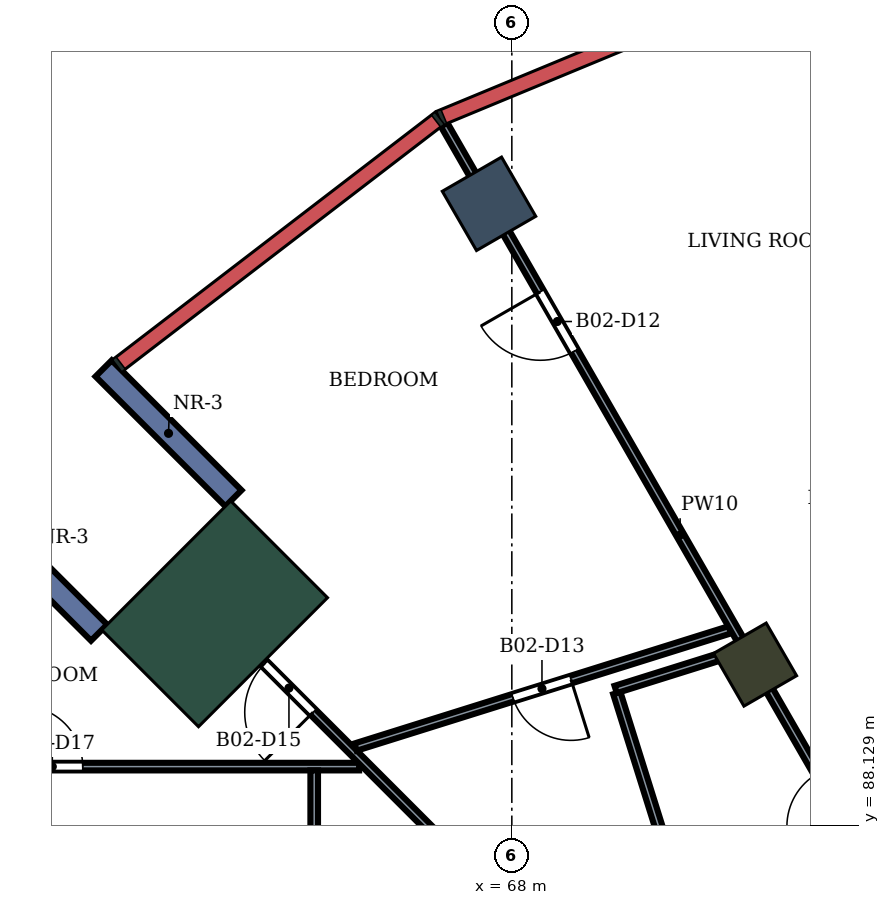
"""IFC4 building model, lengths in metres.
Left out: names, types, materials, properties, quantities, classifications, styles, units other than length and angle.
Written with IfcOpenShell. Run it as: python <this file> out.ifc"""

import sys

from ifc_helpers import new_model, si_unit, direction, frame, frame_2d, origin, origin_2d, place, context, subcontext, project, spatial, rectangle, extrude, element, fill, save


model = new_model("IFC4")
c1 = context("Model", 3, precision=1e-05, world=origin(), true_north=direction((0.0, 1.0)))
c2 = subcontext(c1, "Body", "Model", "MODEL_VIEW")
j1 = project(units=[si_unit("LENGTHUNIT", "METRE"), si_unit("PLANEANGLEUNIT", "RADIAN")], contexts=[c1])
p1 = place(None, origin())
s1 = spatial("IfcSite", under=j1, at=p1, CompositionType="ELEMENT")
p2 = place(p1, origin())
s2 = spatial("IfcBuilding", under=s1, at=p2, CompositionType="ELEMENT")
p3 = place(p2, frame((0.0, 0.0, 225.1)))
s3 = spatial("IfcBuildingStorey", under=s2, at=p3, CompositionType="ELEMENT", Elevation=225.1)
p4 = place(p3, frame((67.7, 96.304, 0.0), z_axis=(0.0, 0.0, 1.0), x_axis=(-0.5, 0.866025403784, 0.0)))
e1 = element("IfcColumn", 1, at=p4, inside=s3, PredefinedType="COLUMN", context=c2, shape_type="SweptSolid", body=[
    extrude(rectangle(XDim=0.9, YDim=0.9, at=origin_2d()), origin(), (0.0, 0.0, 1.0), 4.2),
])
p5 = place(p3, frame((71.2, 90.242, 0.0), z_axis=(0.0, 0.0, 1.0), x_axis=(-0.5, 0.866025403784, 0.0)))
e2 = element("IfcColumn", 2, at=p5, inside=s3, PredefinedType="COLUMN", context=c2, shape_type="SweptSolid", body=[
    extrude(rectangle(XDim=0.8, YDim=0.8, at=origin_2d()), origin(), (0.0, 0.0, 1.0), 4.2),
])
p6 = place(p3, frame((64.09, 90.91, 0.0), z_axis=(0.0, 0.0, 1.0), x_axis=(-0.707106781187, 0.707106781187, 0.0)))
e3 = element("IfcColumn", 3, at=p6, inside=s3, PredefinedType="COLUMN", context=c2, shape_type="SweptSolid", body=[
    extrude(rectangle(XDim=1.8, YDim=2.4, at=origin_2d()), origin(), (0.0, 0.0, 1.0), 4.2),
])
for number, where, z_axis, x_axis in (
    (4, (64.338, 92.43, 0.0), (0.0, 0.0, 1.0), (-0.707, 0.707, 0.0)),
    (5, (62.57, 90.662, 0.0), (0.0, 0.0, 1.0), (-0.707, 0.707, 0.0)),
):
    element("IfcWall", number, at=place(p3, frame(where, z_axis=z_axis, x_axis=x_axis)), inside=s3, PredefinedType="NOTDEFINED", context=c2, shape_type="SweptSolid", body=[
        extrude(rectangle(XDim=2.416, YDim=0.3, at=frame_2d((1.208, 0.0))), origin(), (0.0, 0.0, 1.0), 4.2),
    ])
p7 = place(p3, frame((58.379, 88.9, 0.0), z_axis=(0.0, 0.0, 1.0), x_axis=(1.0, 0.0, 0.0)))
e6 = element("IfcWall", 6, at=p7, inside=s3, PredefinedType="PARTITIONING", context=c2, shape_type="SweptSolid", body=[
    extrude(rectangle(XDim=7.612, YDim=0.1, at=frame_2d((3.806, 0.0))), origin(), (0.0, 0.0, 1.0), 3.75),
])
p8 = place(p7, frame((3.176, 0.0, 0.0)))
e7 = element("IfcOpeningElement", 7, at=p8, cuts=e6, PredefinedType="OPENING", context=c2, shape_type="SweptSolid", body=[
    extrude(rectangle(XDim=0.8, YDim=2.1, at=frame_2d((0.4, 1.05))), frame((0.0, 0.06, 0.0), z_axis=(0.0, -1.0, 0.0), x_axis=(1.0, 0.0, 0.0)), (0.0, 0.0, 1.0), 0.12),
])
p9 = place(p3, frame((63.596, 91.406, 0.0), z_axis=(0.0, 0.0, 1.0), x_axis=(0.70700623685, -0.707207311228, 0.0)))
e8 = element("IfcWall", 8, at=p9, inside=s3, PredefinedType="PARTITIONING", context=c2, shape_type="SweptSolid", body=[
    extrude(rectangle(XDim=8.499, YDim=0.1, at=frame_2d((4.25, 0.0))), origin(), (0.0, 0.0, 1.0), 3.75),
])
p10 = place(p9, frame((1.632, 0.0, 0.0)))
e9 = element("IfcOpeningElement", 9, at=p10, cuts=e8, PredefinedType="OPENING", context=c2, shape_type="SweptSolid", body=[
    extrude(rectangle(XDim=0.9, YDim=2.1, at=frame_2d((0.45, 1.05))), frame((0.0, 0.06, 0.0), z_axis=(0.0, -1.0, 0.0), x_axis=(1.0, 0.0, 0.0)), (0.0, 0.0, 1.0), 0.12),
])
p11 = place(p3, frame((65.4, 85.0, 0.0), z_axis=(0.0, 0.0, 1.0), x_axis=(0.0, 1.0, 0.0)))
e10 = element("IfcWall", 10, at=p11, inside=s3, PredefinedType="PARTITIONING", context=c2, shape_type="SweptSolid", body=[
    extrude(rectangle(XDim=3.85, YDim=0.1, at=frame_2d((1.925, 0.0))), origin(), (0.0, 0.0, 1.0), 3.75),
])
p12 = place(p11, frame((1.5, 0.0, 0.0)))
e11 = element("IfcOpeningElement", 11, at=p12, cuts=e10, PredefinedType="OPENING", context=c2, shape_type="SweptSolid", body=[
    extrude(rectangle(XDim=0.8, YDim=2.1, at=frame_2d((0.4, 1.05))), frame((0.0, 0.06, 0.0), z_axis=(0.0, -1.0, 0.0), x_axis=(1.0, 0.0, 0.0)), (0.0, 0.0, 1.0), 0.12),
])
p13 = place(p3, frame((65.944, 89.157, 0.0), z_axis=(0.0, 0.0, 1.0), x_axis=(0.954235485309, 0.299056246512, 0.0)))
e12 = element("IfcWall", 12, at=p13, inside=s3, PredefinedType="PARTITIONING", context=c2, shape_type="SweptSolid", body=[
    extrude(rectangle(XDim=5.159, YDim=0.1, at=frame_2d((2.58, 0.0))), origin(), (0.0, 0.0, 1.0), 3.75),
])
p14 = place(p13, frame((2.17, 0.0, 0.0)))
e13 = element("IfcOpeningElement", 13, at=p14, cuts=e12, PredefinedType="OPENING", context=c2, shape_type="SweptSolid", body=[
    extrude(rectangle(XDim=0.8, YDim=2.1, at=frame_2d((0.4, 1.05))), frame((0.0, 0.06, 0.0), z_axis=(0.0, -1.0, 0.0), x_axis=(1.0, 0.0, 0.0)), (0.0, 0.0, 1.0), 0.12),
])
p15 = place(p3, frame((67.109, 97.346, 0.0), z_axis=(0.0, 0.0, 1.0), x_axis=(0.498583439824, -0.866841711925, 0.0)))
e14 = element("IfcWall", 14, at=p15, inside=s3, PredefinedType="PARTITIONING", context=c2, shape_type="SweptSolid", body=[
    extrude(rectangle(XDim=12.456, YDim=0.1, at=frame_2d((6.228, 0.0))), origin(), (0.0, 0.0, 1.0), 3.75),
])
p16 = place(p15, frame((2.538, 0.0, 0.0)))
e15 = element("IfcOpeningElement", 15, at=p16, cuts=e14, PredefinedType="OPENING", context=c2, shape_type="SweptSolid", body=[
    extrude(rectangle(XDim=0.9, YDim=2.1, at=frame_2d((0.45, 1.05))), frame((0.0, 0.06, 0.0), z_axis=(0.0, -1.0, 0.0), x_axis=(1.0, 0.0, 0.0)), (0.0, 0.0, 1.0), 0.12),
])
p17 = place(p15, frame((9.85, 0.0, 0.0)))
e16 = element("IfcOpeningElement", 16, at=p17, cuts=e14, PredefinedType="OPENING", context=c2, shape_type="SweptSolid", body=[
    extrude(rectangle(XDim=0.8, YDim=2.1, at=frame_2d((0.4, 1.05))), frame((0.0, 0.06, 0.0), z_axis=(0.0, -1.0, 0.0), x_axis=(1.0, 0.0, 0.0)), (0.0, 0.0, 1.0), 0.12),
])
p18 = place(p3, frame((69.381, 89.867, 0.0), z_axis=(0.0, 0.0, 1.0), x_axis=(0.29908659099, -0.954225974856, 0.0)))
e17 = element("IfcWall", 17, at=p18, inside=s3, PredefinedType="PARTITIONING", context=c2, shape_type="SweptSolid", body=[
    extrude(rectangle(XDim=4.35, YDim=0.1, at=frame_2d((2.175, 0.0))), origin(), (0.0, 0.0, 1.0), 3.75),
])
p19 = place(p3, frame((69.366, 89.915, 0.0), z_axis=(0.0, 0.0, 1.0), x_axis=(0.954163830168, 0.299284789457, 0.0)))
e18 = element("IfcWall", 18, at=p19, inside=s3, PredefinedType="PARTITIONING", context=c2, shape_type="SweptSolid", body=[
    extrude(rectangle(XDim=1.734, YDim=0.1, at=frame_2d((0.867, 0.0))), origin(), (0.0, 0.0, 1.0), 3.75),
])
p20 = place(p16, frame((0.9, 0.0, 0.0), z_axis=(0.0, 0.0, 1.0), x_axis=(-1.0, 0.0, 0.0)))
e19 = element("IfcDoor", 19, at=p20, inside=s3, OperationType="SINGLE_SWING_RIGHT", PredefinedType="DOOR", context=c2, shape_type="SweptSolid", body=[
    extrude(rectangle(XDim=0.9, YDim=2.1, at=frame_2d((0.45, 1.05))), frame((0.0, 0.025, 0.0), z_axis=(0.0, -1.0, 0.0), x_axis=(1.0, 0.0, 0.0)), (0.0, 0.0, 1.0), 0.05),
])
fill(e15, e19)
p21 = place(p14, frame((0.8, 0.0, 0.0), z_axis=(0.0, 0.0, 1.0), x_axis=(-1.0, 0.0, 0.0)))
e20 = element("IfcDoor", 20, at=p21, inside=s3, OperationType="SINGLE_SWING_LEFT", PredefinedType="DOOR", context=c2, shape_type="SweptSolid", body=[
    extrude(rectangle(XDim=0.8, YDim=2.1, at=frame_2d((0.4, 1.05))), frame((0.0, 0.025, 0.0), z_axis=(0.0, -1.0, 0.0), x_axis=(1.0, 0.0, 0.0)), (0.0, 0.0, 1.0), 0.05),
])
fill(e13, e20)
p22 = place(p10, frame((0.9, 0.0, 0.0), z_axis=(0.0, 0.0, 1.0), x_axis=(-1.0, 0.0, 0.0)))
e21 = element("IfcDoor", 21, at=p22, inside=s3, OperationType="SINGLE_SWING_LEFT", PredefinedType="DOOR", context=c2, shape_type="SweptSolid", body=[
    extrude(rectangle(XDim=0.9, YDim=2.1, at=frame_2d((0.45, 1.05))), frame((0.0, 0.025, 0.0), z_axis=(0.0, -1.0, 0.0), x_axis=(1.0, 0.0, 0.0)), (0.0, 0.0, 1.0), 0.05),
])
fill(e9, e21)
p23 = place(p8, origin())
e22 = element("IfcDoor", 22, at=p23, inside=s3, OperationType="SINGLE_SWING_LEFT", PredefinedType="DOOR", context=c2, shape_type="SweptSolid", body=[
    extrude(rectangle(XDim=0.8, YDim=2.1, at=frame_2d((0.4, 1.05))), frame((0.0, 0.025, 0.0), z_axis=(0.0, -1.0, 0.0), x_axis=(1.0, 0.0, 0.0)), (0.0, 0.0, 1.0), 0.05),
])
fill(e7, e22)
save(model, sys.argv[1])
